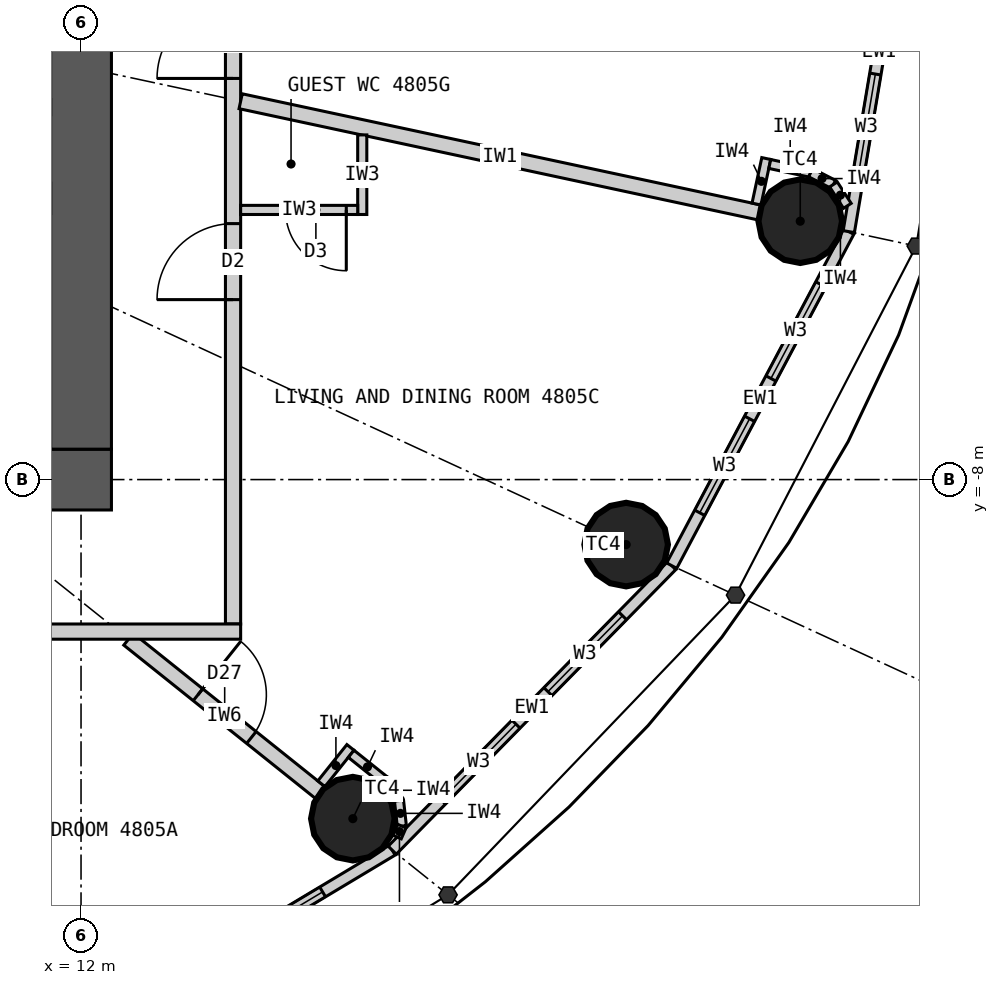
"""IFC4 building model, lengths in metres.
Left out: names, types, materials, properties, quantities, classifications, styles, units other than length and angle.
Written with IfcOpenShell. Run it as: python <this file> out.ifc"""

import sys

from ifc_helpers import new_model, si_unit, direction, frame, frame_2d, origin, origin_2d, place, context, subcontext, project, spatial, rectangle, circle, extrude, element, fill, save


model = new_model("IFC4")
c1 = context("Model", 3, precision=1e-05, world=origin(), true_north=direction((0.0, 1.0)))
c2 = subcontext(c1, "Body", "Model", "MODEL_VIEW")
j1 = project(units=[si_unit("LENGTHUNIT", "METRE"), si_unit("PLANEANGLEUNIT", "RADIAN")], contexts=[c1])
p1 = place(None, origin())
s1 = spatial("IfcSite", under=j1, at=p1, CompositionType="ELEMENT")
p2 = place(p1, origin())
s2 = spatial("IfcBuilding", under=s1, at=p2, CompositionType="ELEMENT")
p3 = place(p2, frame((0.0, 0.0, 179.7)))
s3 = spatial("IfcBuildingStorey", under=s2, at=p3, CompositionType="ELEMENT", Elevation=179.7)
for number, where, z_axis, x_axis in (
    (1, (15.576, -12.461, 0.0), (0.0, 0.0, 1.0), (1.0, 0.0, 0.0)),
    (2, (19.172, -8.855, 0.0), (0.0, 0.0, 1.0), (1.0, 0.0, 0.0)),
    (3, (21.463, -4.601, 0.0), (0.0, 0.0, 1.0), (1.0, 0.0, 0.0)),
):
    element("IfcColumn", number, at=place(p3, frame(where, z_axis=z_axis, x_axis=x_axis)), inside=s3, PredefinedType="COLUMN", context=c2, shape_type="SweptSolid", body=[
        extrude(circle(Radius=0.55, at=origin_2d()), origin(), (0.0, 0.0, 1.0), 3.3),
    ])
p4 = place(p3, frame((12.4, -8.0, 0.0), z_axis=(0.0, 0.0, 1.0), x_axis=(-1.0, 0.0, 0.0)))
e4 = element("IfcWall", 4, at=p4, inside=s3, PredefinedType="SHEAR", context=c2, shape_type="SweptSolid", body=[
    extrude(rectangle(XDim=24.8, YDim=0.8, at=frame_2d((12.4, 0.0))), origin(), (0.0, 0.0, 1.0), 3.3),
])
p5 = place(p4, frame((11.1, 0.0, 0.0)))
e5 = element("IfcOpeningElement", 5, at=p5, cuts=e4, PredefinedType="OPENING", context=c2, shape_type="SweptSolid", body=[
    extrude(rectangle(XDim=1.2, YDim=2.2, at=frame_2d((0.6, 1.1))), frame((0.0, 0.41, 0.0), z_axis=(0.0, -1.0, 0.0), x_axis=(1.0, 0.0, 0.0)), (0.0, 0.0, 1.0), 0.82),
])
p6 = place(p4, frame((18.7, 0.0, 0.0)))
e6 = element("IfcOpeningElement", 6, at=p6, cuts=e4, PredefinedType="OPENING", context=c2, shape_type="SweptSolid", body=[
    extrude(rectangle(XDim=0.9, YDim=2.2, at=frame_2d((0.45, 1.1))), frame((0.0, 0.41, 0.0), z_axis=(0.0, -1.0, 0.0), x_axis=(1.0, 0.0, 0.0)), (0.0, 0.0, 1.0), 0.82),
])
p7 = place(p3, frame((12.0, -7.6, 0.0), z_axis=(0.0, 0.0, 1.0), x_axis=(0.0, 1.0, 0.0)))
e7 = element("IfcWall", 7, at=p7, inside=s3, PredefinedType="SHEAR", context=c2, shape_type="SweptSolid", body=[
    extrude(rectangle(XDim=15.2, YDim=0.8, at=frame_2d((7.6, 0.0))), origin(), (0.0, 0.0, 1.0), 3.3),
])
p8 = place(p7, frame((6.7, 0.0, 0.0)))
e8 = element("IfcOpeningElement", 8, at=p8, cuts=e7, PredefinedType="OPENING", context=c2, shape_type="SweptSolid", body=[
    extrude(rectangle(XDim=1.8, YDim=2.2, at=frame_2d((0.9, 1.1))), frame((0.0, 0.41, 0.0), z_axis=(0.0, -1.0, 0.0), x_axis=(1.0, 0.0, 0.0)), (0.0, 0.0, 1.0), 0.82),
])
p9 = place(p3, frame((11.346, -15.722, 0.0), z_axis=(0.0, 0.0, 1.0), x_axis=(0.857695199231, 0.514158482587, 0.0)))
e9 = element("IfcWall", 9, at=p9, inside=s3, PredefinedType="ELEMENTEDWALL", context=c2, shape_type="SweptSolid", body=[
    extrude(rectangle(XDim=5.536, YDim=0.15, at=frame_2d((2.768, 0.0))), origin(), (0.0, 0.0, 1.0), 3.12),
])
p10 = place(p9, frame((1.068, 0.0, 0.9)))
e10 = element("IfcOpeningElement", 10, at=p10, cuts=e9, PredefinedType="OPENING", context=c2, shape_type="SweptSolid", body=[
    extrude(rectangle(XDim=1.4, YDim=1.9, at=frame_2d((0.7, 0.95))), frame((0.0, 0.085, 0.0), z_axis=(0.0, -1.0, 0.0), x_axis=(1.0, 0.0, 0.0)), (0.0, 0.0, 1.0), 0.17),
])
p11 = place(p9, frame((3.068, 0.0, 0.9)))
e11 = element("IfcOpeningElement", 11, at=p11, cuts=e9, PredefinedType="OPENING", context=c2, shape_type="SweptSolid", body=[
    extrude(rectangle(XDim=1.4, YDim=1.9, at=frame_2d((0.7, 0.95))), frame((0.0, 0.085, 0.0), z_axis=(0.0, -1.0, 0.0), x_axis=(1.0, 0.0, 0.0)), (0.0, 0.0, 1.0), 0.17),
])
p12 = place(p3, frame((16.095, -12.876, 0.0), z_axis=(0.0, 0.0, 1.0), x_axis=(0.700727467776, 0.71342905457, 0.0)))
e12 = element("IfcWall", 12, at=p12, inside=s3, PredefinedType="ELEMENTEDWALL", context=c2, shape_type="SweptSolid", body=[
    extrude(rectangle(XDim=5.247, YDim=0.15, at=frame_2d((2.624, 0.0))), origin(), (0.0, 0.0, 1.0), 3.12),
])
p13 = place(p12, frame((0.924, 0.0, 0.9)))
e13 = element("IfcOpeningElement", 13, at=p13, cuts=e12, PredefinedType="OPENING", context=c2, shape_type="SweptSolid", body=[
    extrude(rectangle(XDim=1.4, YDim=1.9, at=frame_2d((0.7, 0.95))), frame((0.0, 0.085, 0.0), z_axis=(0.0, -1.0, 0.0), x_axis=(1.0, 0.0, 0.0)), (0.0, 0.0, 1.0), 0.17),
])
p14 = place(p12, frame((2.924, 0.0, 0.9)))
e14 = element("IfcOpeningElement", 14, at=p14, cuts=e12, PredefinedType="OPENING", context=c2, shape_type="SweptSolid", body=[
    extrude(rectangle(XDim=1.4, YDim=1.9, at=frame_2d((0.7, 0.95))), frame((0.0, 0.085, 0.0), z_axis=(0.0, -1.0, 0.0), x_axis=(1.0, 0.0, 0.0)), (0.0, 0.0, 1.0), 0.17),
])
p15 = place(p3, frame((19.772, -9.132, 0.0), z_axis=(0.0, 0.0, 1.0), x_axis=(0.468428906714, 0.883501193748, 0.0)))
e15 = element("IfcWall", 15, at=p15, inside=s3, PredefinedType="ELEMENTEDWALL", context=c2, shape_type="SweptSolid", body=[
    extrude(rectangle(XDim=4.974, YDim=0.15, at=frame_2d((2.487, 0.0))), origin(), (0.0, 0.0, 1.0), 3.12),
])
p16 = place(p15, frame((0.787, 0.0, 0.9)))
e16 = element("IfcOpeningElement", 16, at=p16, cuts=e15, PredefinedType="OPENING", context=c2, shape_type="SweptSolid", body=[
    extrude(rectangle(XDim=1.4, YDim=1.9, at=frame_2d((0.7, 0.95))), frame((0.0, 0.085, 0.0), z_axis=(0.0, -1.0, 0.0), x_axis=(1.0, 0.0, 0.0)), (0.0, 0.0, 1.0), 0.17),
])
p17 = place(p15, frame((2.787, 0.0, 0.9)))
e17 = element("IfcOpeningElement", 17, at=p17, cuts=e15, PredefinedType="OPENING", context=c2, shape_type="SweptSolid", body=[
    extrude(rectangle(XDim=1.4, YDim=1.9, at=frame_2d((0.7, 0.95))), frame((0.0, 0.085, 0.0), z_axis=(0.0, -1.0, 0.0), x_axis=(1.0, 0.0, 0.0)), (0.0, 0.0, 1.0), 0.17),
])
p18 = place(p3, frame((22.102, -4.738, 0.0), z_axis=(0.0, 0.0, 1.0), x_axis=(0.166162111254, 0.986098449843, 0.0)))
e18 = element("IfcWall", 18, at=p18, inside=s3, PredefinedType="ELEMENTEDWALL", context=c2, shape_type="SweptSolid", body=[
    extrude(rectangle(XDim=4.805, YDim=0.15, at=frame_2d((2.402, 0.0))), origin(), (0.0, 0.0, 1.0), 3.12),
])
p19 = place(p18, frame((0.702, 0.0, 0.9)))
e19 = element("IfcOpeningElement", 19, at=p19, cuts=e18, PredefinedType="OPENING", context=c2, shape_type="SweptSolid", body=[
    extrude(rectangle(XDim=1.4, YDim=1.9, at=frame_2d((0.7, 0.95))), frame((0.0, 0.085, 0.0), z_axis=(0.0, -1.0, 0.0), x_axis=(1.0, 0.0, 0.0)), (0.0, 0.0, 1.0), 0.17),
])
p20 = place(p18, frame((2.702, 0.0, 0.9)))
e20 = element("IfcOpeningElement", 20, at=p20, cuts=e18, PredefinedType="OPENING", context=c2, shape_type="SweptSolid", body=[
    extrude(rectangle(XDim=1.4, YDim=1.9, at=frame_2d((0.7, 0.95))), frame((0.0, 0.085, 0.0), z_axis=(0.0, -1.0, 0.0), x_axis=(1.0, 0.0, 0.0)), (0.0, 0.0, 1.0), 0.17),
])
p21 = place(p3, frame((14.0, -9.9, 0.0), z_axis=(0.0, 0.0, 1.0), x_axis=(0.0, 1.0, 0.0)))
e21 = element("IfcWall", 21, at=p21, inside=s3, PredefinedType="PARTITIONING", context=c2, shape_type="SweptSolid", body=[
    extrude(rectangle(XDim=19.8, YDim=0.2, at=frame_2d((9.9, 0.0))), origin(), (0.0, 0.0, 1.0), 3.12),
])
p22 = place(p21, frame((4.268, 0.0, 0.0)))
e22 = element("IfcOpeningElement", 22, at=p22, cuts=e21, PredefinedType="OPENING", context=c2, shape_type="SweptSolid", body=[
    extrude(rectangle(XDim=1.0, YDim=2.2, at=frame_2d((0.5, 1.1))), frame((0.0, 0.11, 0.0), z_axis=(0.0, -1.0, 0.0), x_axis=(1.0, 0.0, 0.0)), (0.0, 0.0, 1.0), 0.22),
])
p23 = place(p21, frame((7.177, 0.0, 0.0)))
e23 = element("IfcOpeningElement", 23, at=p23, cuts=e21, PredefinedType="OPENING", context=c2, shape_type="SweptSolid", body=[
    extrude(rectangle(XDim=1.0, YDim=2.2, at=frame_2d((0.5, 1.1))), frame((0.0, 0.11, 0.0), z_axis=(0.0, -1.0, 0.0), x_axis=(1.0, 0.0, 0.0)), (0.0, 0.0, 1.0), 0.22),
])
p24 = place(p21, frame((17.701, 0.0, 0.0)))
e24 = element("IfcOpeningElement", 24, at=p24, cuts=e21, PredefinedType="OPENING", context=c2, shape_type="SweptSolid", body=[
    extrude(rectangle(XDim=1.0, YDim=2.2, at=frame_2d((0.5, 1.1))), frame((0.0, 0.11, 0.0), z_axis=(0.0, -1.0, 0.0), x_axis=(1.0, 0.0, 0.0)), (0.0, 0.0, 1.0), 0.22),
])
p25 = place(p3, frame((12.625, -10.1, 0.0), z_axis=(0.0, 0.0, 1.0), x_axis=(0.780876185034, -0.624685827954, 0.0)))
e25 = element("IfcWall", 25, at=p25, inside=s3, PredefinedType="PARTITIONING", context=c2, shape_type="SweptSolid", body=[
    extrude(rectangle(XDim=3.229, YDim=0.2, at=frame_2d((1.615, 0.0))), origin(), (0.0, 0.0, 1.0), 2.27),
])
p26 = place(p25, frame((1.17, 0.0, 0.0)))
e26 = element("IfcOpeningElement", 26, at=p26, cuts=e25, PredefinedType="OPENING", context=c2, shape_type="SweptSolid", body=[
    extrude(rectangle(XDim=0.9, YDim=2.1, at=frame_2d((0.45, 1.05))), frame((0.0, 0.11, 0.0), z_axis=(0.0, -1.0, 0.0), x_axis=(1.0, 0.0, 0.0)), (0.0, 0.0, 1.0), 0.22),
])
p27 = place(p3, frame((14.1, -3.022, 0.0), z_axis=(0.0, 0.0, 1.0), x_axis=(0.977790639684, -0.209584028367, 0.0)))
e27 = element("IfcWall", 27, at=p27, inside=s3, PredefinedType="PARTITIONING", context=c2, shape_type="SweptSolid", body=[
    extrude(rectangle(XDim=6.98, YDim=0.2, at=frame_2d((3.49, 0.0))), origin(), (0.0, 0.0, 1.0), 2.27),
])
p28 = place(p3, frame((15.7, -3.465, 0.0), z_axis=(0.0, 0.0, 1.0), x_axis=(0.0, -1.0, 0.0)))
e28 = element("IfcWall", 28, at=p28, inside=s3, PredefinedType="PARTITIONING", context=c2, shape_type="SweptSolid", body=[
    extrude(rectangle(XDim=1.047, YDim=0.12, at=frame_2d((0.523, 0.0))), origin(), (0.0, 0.0, 1.0), 3.12),
])
p29 = place(p3, frame((14.1, -4.452, 0.0), z_axis=(0.0, 0.0, 1.0), x_axis=(1.0, 0.0, 0.0)))
e29 = element("IfcWall", 29, at=p29, inside=s3, PredefinedType="PARTITIONING", context=c2, shape_type="SweptSolid", body=[
    extrude(rectangle(XDim=1.54, YDim=0.12, at=frame_2d((0.77, 0.0))), origin(), (0.0, 0.0, 1.0), 3.12),
])
p30 = place(p29, frame((0.59, 0.0, 0.0)))
e30 = element("IfcOpeningElement", 30, at=p30, cuts=e29, PredefinedType="OPENING", context=c2, shape_type="SweptSolid", body=[
    extrude(rectangle(XDim=0.8, YDim=2.1, at=frame_2d((0.4, 1.05))), frame((0.0, 0.07, 0.0), z_axis=(0.0, -1.0, 0.0), x_axis=(1.0, 0.0, 0.0)), (0.0, 0.0, 1.0), 0.14),
])
p31 = place(p3, frame((14.1, -10.0, 0.0), z_axis=(0.0, 0.0, 1.0), x_axis=(-1.0, 0.0, 0.0)))
e31 = element("IfcWall", 31, at=p31, inside=s3, PredefinedType="PARTITIONING", context=c2, shape_type="SweptSolid", body=[
    extrude(rectangle(XDim=10.582, YDim=0.2, at=frame_2d((5.291, 0.0))), origin(), (0.0, 0.0, 1.0), 3.12),
])
p32 = place(p3, frame((15.162, -12.002, 0.0), z_axis=(0.0, 0.0, 1.0), x_axis=(0.624597762427, 0.780946627607, 0.0)))
e32 = element("IfcWall", 32, at=p32, inside=s3, PredefinedType="PARTITIONING", context=c2, shape_type="SweptSolid", body=[
    extrude(rectangle(XDim=0.612, YDim=0.12, at=frame_2d((0.306, 0.0))), origin(), (0.0, 0.0, 1.0), 3.12),
])
p33 = place(p3, frame((15.554, -11.608, 0.0), z_axis=(0.0, 0.0, 1.0), x_axis=(0.780695577787, -0.624911525597, 0.0)))
e33 = element("IfcWall", 33, at=p33, inside=s3, PredefinedType="PARTITIONING", context=c2, shape_type="SweptSolid", body=[
    extrude(rectangle(XDim=0.55, YDim=0.12, at=frame_2d((0.275, 0.0))), origin(), (0.0, 0.0, 1.0), 3.12),
])
p34 = place(p3, frame((15.984, -11.952, 0.0), z_axis=(0.0, 0.0, 1.0), x_axis=(0.592335221171, -0.805691619517, 0.0)))
e34 = element("IfcWall", 34, at=p34, inside=s3, PredefinedType="PARTITIONING", context=c2, shape_type="SweptSolid", body=[
    extrude(rectangle(XDim=0.338, YDim=0.12, at=frame_2d((0.169, 0.0))), origin(), (0.0, 0.0, 1.0), 3.12),
])
p35 = place(p3, frame((16.184, -12.224, 0.0), z_axis=(0.0, 0.0, 1.0), x_axis=(0.110669692975, -0.993857242795, 0.0)))
e35 = element("IfcWall", 35, at=p35, inside=s3, PredefinedType="PARTITIONING", context=c2, shape_type="SweptSolid", body=[
    extrude(rectangle(XDim=0.337, YDim=0.12, at=frame_2d((0.169, 0.0))), origin(), (0.0, 0.0, 1.0), 3.12),
])
p36 = place(p3, frame((16.221, -12.559, 0.0), z_axis=(0.0, 0.0, 1.0), x_axis=(-0.401064416249, -0.916049853457, 0.0)))
e36 = element("IfcWall", 36, at=p36, inside=s3, PredefinedType="PARTITIONING", context=c2, shape_type="SweptSolid", body=[
    extrude(rectangle(XDim=0.156, YDim=0.12, at=frame_2d((0.078, 0.0))), origin(), (0.0, 0.0, 1.0), 3.12),
])
p37 = place(p3, frame((20.887, -4.375, 0.0), z_axis=(0.0, 0.0, 1.0), x_axis=(0.209746941802, 0.977755705892, 0.0)))
e37 = element("IfcWall", 37, at=p37, inside=s3, PredefinedType="PARTITIONING", context=c2, shape_type="SweptSolid", body=[
    extrude(rectangle(XDim=0.612, YDim=0.12, at=frame_2d((0.306, 0.0))), origin(), (0.0, 0.0, 1.0), 3.12),
])
p38 = place(p3, frame((21.062, -3.848, 0.0), z_axis=(0.0, 0.0, 1.0), x_axis=(0.977789415726, -0.209589738521, 0.0)))
e38 = element("IfcWall", 38, at=p38, inside=s3, PredefinedType="PARTITIONING", context=c2, shape_type="SweptSolid", body=[
    extrude(rectangle(XDim=0.55, YDim=0.12, at=frame_2d((0.275, 0.0))), origin(), (0.0, 0.0, 1.0), 3.12),
])
p39 = place(p3, frame((21.599, -3.963, 0.0), z_axis=(0.0, 0.0, 1.0), x_axis=(0.890193602875, -0.455582428766, 0.0)))
e39 = element("IfcWall", 39, at=p39, inside=s3, PredefinedType="PARTITIONING", context=c2, shape_type="SweptSolid", body=[
    extrude(rectangle(XDim=0.338, YDim=0.12, at=frame_2d((0.169, 0.0))), origin(), (0.0, 0.0, 1.0), 3.12),
])
p40 = place(p3, frame((21.9, -4.117, 0.0), z_axis=(0.0, 0.0, 1.0), x_axis=(0.543582688681, -0.839355622228, 0.0)))
e40 = element("IfcWall", 40, at=p40, inside=s3, PredefinedType="PARTITIONING", context=c2, shape_type="SweptSolid", body=[
    extrude(rectangle(XDim=0.336, YDim=0.12, at=frame_2d((0.168, 0.0))), origin(), (0.0, 0.0, 1.0), 3.12),
])
p41 = place(p11, origin())
e41 = element("IfcWindow", 41, at=p41, inside=s3, PartitioningType="SINGLE_PANEL", PredefinedType="WINDOW", context=c2, shape_type="SweptSolid", body=[
    extrude(rectangle(XDim=1.4, YDim=1.9, at=frame_2d((0.7, 0.95))), frame((0.0, 0.03, 0.0), z_axis=(0.0, -1.0, 0.0), x_axis=(1.0, 0.0, 0.0)), (0.0, 0.0, 1.0), 0.06),
])
fill(e11, e41)
p42 = place(p13, origin())
e42 = element("IfcWindow", 42, at=p42, inside=s3, PartitioningType="SINGLE_PANEL", PredefinedType="WINDOW", context=c2, shape_type="SweptSolid", body=[
    extrude(rectangle(XDim=1.4, YDim=1.9, at=frame_2d((0.7, 0.95))), frame((0.0, 0.03, 0.0), z_axis=(0.0, -1.0, 0.0), x_axis=(1.0, 0.0, 0.0)), (0.0, 0.0, 1.0), 0.06),
])
fill(e13, e42)
p43 = place(p14, origin())
e43 = element("IfcWindow", 43, at=p43, inside=s3, PartitioningType="SINGLE_PANEL", PredefinedType="WINDOW", context=c2, shape_type="SweptSolid", body=[
    extrude(rectangle(XDim=1.4, YDim=1.9, at=frame_2d((0.7, 0.95))), frame((0.0, 0.03, 0.0), z_axis=(0.0, -1.0, 0.0), x_axis=(1.0, 0.0, 0.0)), (0.0, 0.0, 1.0), 0.06),
])
fill(e14, e43)
p44 = place(p16, origin())
e44 = element("IfcWindow", 44, at=p44, inside=s3, PartitioningType="SINGLE_PANEL", PredefinedType="WINDOW", context=c2, shape_type="SweptSolid", body=[
    extrude(rectangle(XDim=1.4, YDim=1.9, at=frame_2d((0.7, 0.95))), frame((0.0, 0.03, 0.0), z_axis=(0.0, -1.0, 0.0), x_axis=(1.0, 0.0, 0.0)), (0.0, 0.0, 1.0), 0.06),
])
fill(e16, e44)
p45 = place(p17, origin())
e45 = element("IfcWindow", 45, at=p45, inside=s3, PartitioningType="SINGLE_PANEL", PredefinedType="WINDOW", context=c2, shape_type="SweptSolid", body=[
    extrude(rectangle(XDim=1.4, YDim=1.9, at=frame_2d((0.7, 0.95))), frame((0.0, 0.03, 0.0), z_axis=(0.0, -1.0, 0.0), x_axis=(1.0, 0.0, 0.0)), (0.0, 0.0, 1.0), 0.06),
])
fill(e17, e45)
p46 = place(p19, origin())
e46 = element("IfcWindow", 46, at=p46, inside=s3, PartitioningType="SINGLE_PANEL", PredefinedType="WINDOW", context=c2, shape_type="SweptSolid", body=[
    extrude(rectangle(XDim=1.4, YDim=1.9, at=frame_2d((0.7, 0.95))), frame((0.0, 0.03, 0.0), z_axis=(0.0, -1.0, 0.0), x_axis=(1.0, 0.0, 0.0)), (0.0, 0.0, 1.0), 0.06),
])
fill(e19, e46)
p47 = place(p30, origin())
e47 = element("IfcDoor", 47, at=p47, inside=s3, OperationType="SINGLE_SWING_RIGHT", PredefinedType="DOOR", context=c2, shape_type="SweptSolid", body=[
    extrude(rectangle(XDim=0.8, YDim=2.1, at=frame_2d((0.4, 1.05))), frame((0.0, 0.025, 0.0), z_axis=(0.0, -1.0, 0.0), x_axis=(1.0, 0.0, 0.0)), (0.0, 0.0, 1.0), 0.05),
])
fill(e30, e47)
p48 = place(p22, origin())
e48 = element("IfcDoor", 48, at=p48, inside=s3, OperationType="SINGLE_SWING_LEFT", PredefinedType="DOOR", context=c2, shape_type="SweptSolid", body=[
    extrude(rectangle(XDim=1.0, YDim=2.2, at=frame_2d((0.5, 1.1))), frame((0.0, 0.025, 0.0), z_axis=(0.0, -1.0, 0.0), x_axis=(1.0, 0.0, 0.0)), (0.0, 0.0, 1.0), 0.05),
])
fill(e22, e48)
p49 = place(p26, origin())
e49 = element("IfcDoor", 49, at=p49, inside=s3, OperationType="SINGLE_SWING_LEFT", PredefinedType="DOOR", context=c2, shape_type="SweptSolid", body=[
    extrude(rectangle(XDim=0.9, YDim=2.1, at=frame_2d((0.45, 1.05))), frame((0.0, 0.025, 0.0), z_axis=(0.0, -1.0, 0.0), x_axis=(1.0, 0.0, 0.0)), (0.0, 0.0, 1.0), 0.05),
])
fill(e26, e49)
p50 = place(p23, origin())
e50 = element("IfcDoor", 50, at=p50, inside=s3, OperationType="SINGLE_SWING_LEFT", PredefinedType="DOOR", context=c2, shape_type="SweptSolid", body=[
    extrude(rectangle(XDim=1.0, YDim=2.2, at=frame_2d((0.5, 1.1))), frame((0.0, 0.025, 0.0), z_axis=(0.0, -1.0, 0.0), x_axis=(1.0, 0.0, 0.0)), (0.0, 0.0, 1.0), 0.05),
])
fill(e23, e50)
save(model, sys.argv[1])
